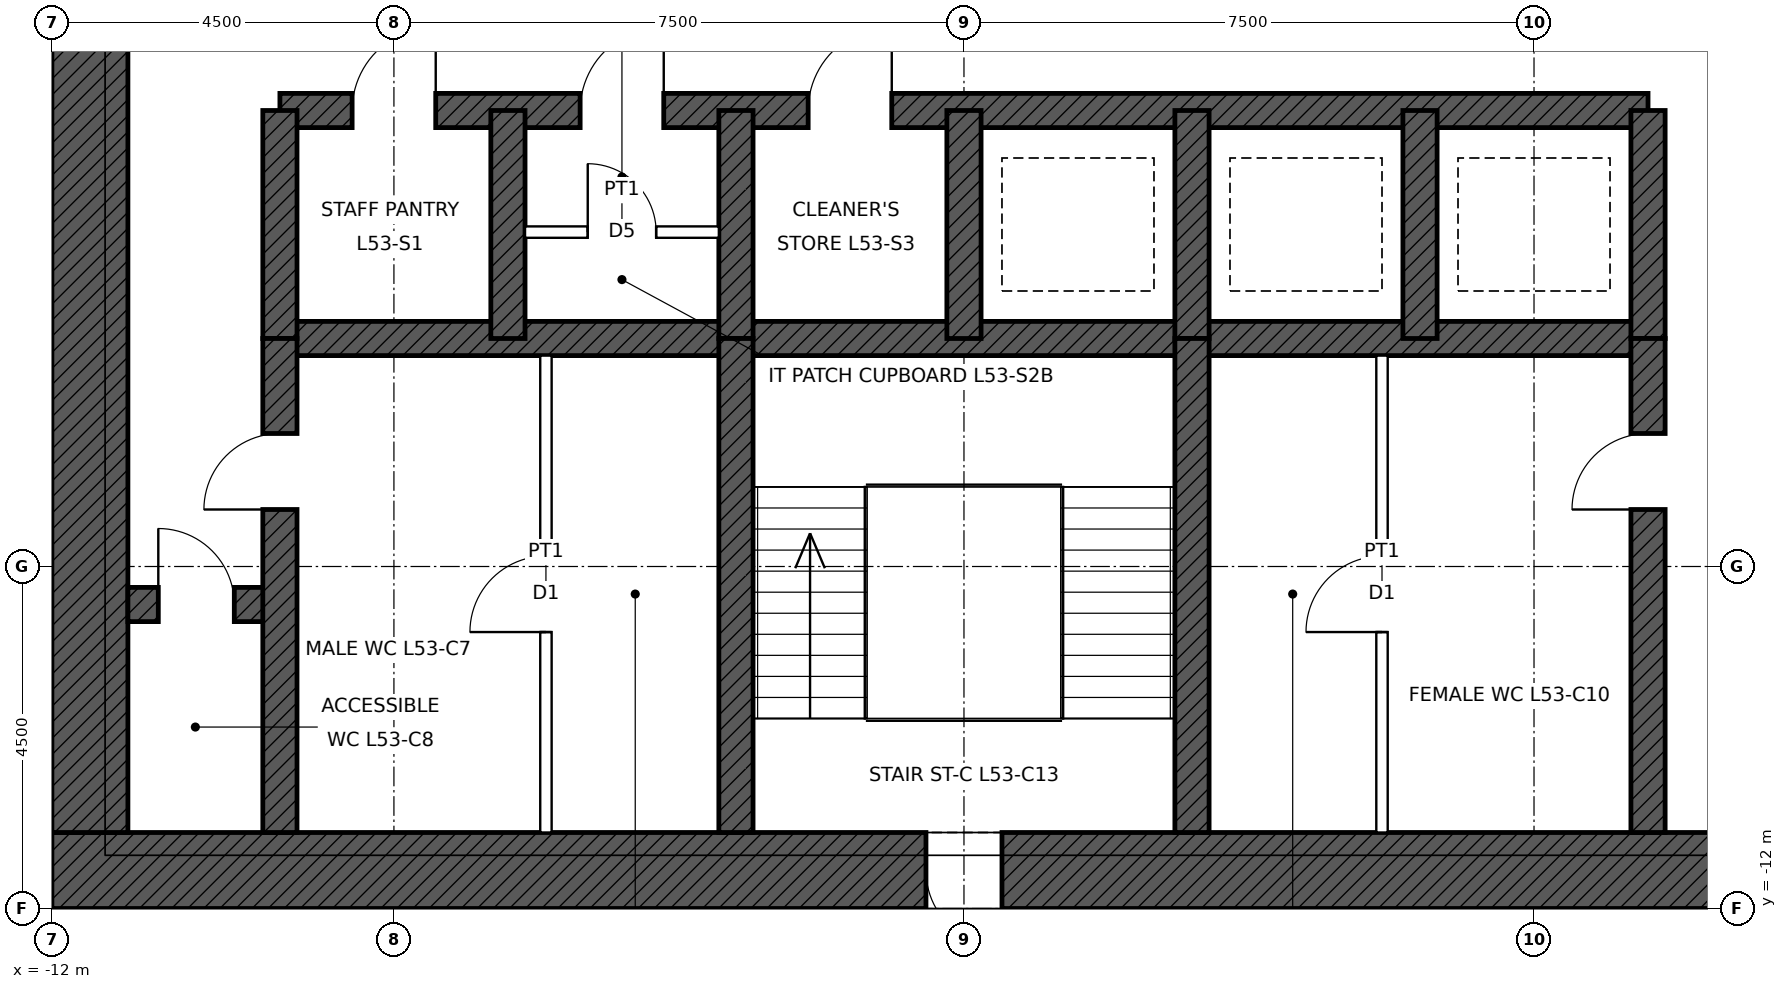
"""IFC4 building model, lengths in metres.
Left out: names, types, materials, properties, quantities, classifications, styles, units other than length and angle.
Written with IfcOpenShell. Run it as: python <this file> out.ifc"""

import sys

from ifc_helpers import new_model, si_unit, direction, frame, frame_2d, origin, place, context, subcontext, project, spatial, rectangle, extrude, element, fill, save


model = new_model("IFC4")
c1 = context("Model", 3, precision=1e-05, world=origin(), true_north=direction((0.0, 1.0)))
c2 = subcontext(c1, "Body", "Model", "MODEL_VIEW")
j1 = project(units=[si_unit("LENGTHUNIT", "METRE"), si_unit("PLANEANGLEUNIT", "RADIAN")], contexts=[c1])
p1 = place(None, origin())
s1 = spatial("IfcSite", under=j1, at=p1, CompositionType="ELEMENT")
p2 = place(p1, origin())
s2 = spatial("IfcBuilding", under=s1, at=p2, CompositionType="ELEMENT")
p3 = place(p2, frame((0.0, 0.0, 245.9)))
s3 = spatial("IfcBuildingStorey", under=s2, at=p3, CompositionType="ELEMENT", Elevation=245.9)
p4 = place(p3, frame((12.0, -11.5, 0.0), z_axis=(0.0, 0.0, 1.0), x_axis=(-1.0, 0.0, 0.0)))
e1 = element("IfcWall", 1, at=p4, inside=s3, PredefinedType="SHEAR", context=c2, shape_type="SweptSolid", body=[
    extrude(rectangle(XDim=24.0, YDim=1.0, at=frame_2d((12.0, 0.0))), origin(), (0.0, 0.0, 1.0), 4.0),
])
p5 = place(p4, frame((11.5, 0.0, 0.0)))
e2 = element("IfcOpeningElement", 2, at=p5, cuts=e1, PredefinedType="OPENING", context=c2, shape_type="SweptSolid", body=[
    extrude(rectangle(XDim=1.0, YDim=2.1, at=frame_2d((0.5, 1.05))), frame((0.0, 0.51, 0.0), z_axis=(0.0, -1.0, 0.0), x_axis=(1.0, 0.0, 0.0)), (0.0, 0.0, 1.0), 1.02),
])
p6 = place(p4, frame((1.0, 0.0, 0.0)))
e3 = element("IfcOpeningElement", 3, at=p6, cuts=e1, PredefinedType="OPENING", context=c2, shape_type="SweptSolid", body=[
    extrude(rectangle(XDim=1.0, YDim=2.4, at=frame_2d((0.5, 1.2))), frame((0.0, 0.51, 0.0), z_axis=(0.0, -1.0, 0.0), x_axis=(1.0, 0.0, 0.0)), (0.0, 0.0, 1.0), 1.02),
])
p7 = place(p3, frame((-11.5, -11.0, 0.0), z_axis=(0.0, 0.0, 1.0), x_axis=(0.0, 1.0, 0.0)))
e4 = element("IfcWall", 4, at=p7, inside=s3, PredefinedType="SHEAR", context=c2, shape_type="SweptSolid", body=[
    extrude(rectangle(XDim=22.0, YDim=1.0, at=frame_2d((11.0, 0.0))), origin(), (0.0, 0.0, 1.0), 4.0),
])
p8 = place(p7, frame((10.5, 0.0, 0.0)))
e5 = element("IfcOpeningElement", 5, at=p8, cuts=e4, PredefinedType="OPENING", context=c2, shape_type="SweptSolid", body=[
    extrude(rectangle(XDim=1.0, YDim=2.4, at=frame_2d((0.5, 1.2))), frame((0.0, 0.51, 0.0), z_axis=(0.0, -1.0, 0.0), x_axis=(1.0, 0.0, 0.0)), (0.0, 0.0, 1.0), 1.02),
])
p9 = place(p3, frame((-9.0, -1.5, 0.0), z_axis=(0.0, 0.0, 1.0), x_axis=(1.0, 0.0, 0.0)))
e6 = element("IfcWall", 6, at=p9, inside=s3, PredefinedType="SHEAR", context=c2, shape_type="SweptSolid", body=[
    extrude(rectangle(XDim=18.0, YDim=0.45, at=frame_2d((9.0, 0.0))), origin(), (0.0, 0.0, 1.0), 4.0),
])
p10 = place(p9, frame((0.95, 0.0, 0.0)))
e7 = element("IfcOpeningElement", 7, at=p10, cuts=e6, PredefinedType="OPENING", context=c2, shape_type="SweptSolid", body=[
    extrude(rectangle(XDim=1.1, YDim=2.1, at=frame_2d((0.55, 1.05))), frame((0.0, 0.235, 0.0), z_axis=(0.0, -1.0, 0.0), x_axis=(1.0, 0.0, 0.0)), (0.0, 0.0, 1.0), 0.47),
])
p11 = place(p9, frame((3.95, 0.0, 0.0)))
e8 = element("IfcOpeningElement", 8, at=p11, cuts=e6, PredefinedType="OPENING", context=c2, shape_type="SweptSolid", body=[
    extrude(rectangle(XDim=1.1, YDim=2.1, at=frame_2d((0.55, 1.05))), frame((0.0, 0.235, 0.0), z_axis=(0.0, -1.0, 0.0), x_axis=(1.0, 0.0, 0.0)), (0.0, 0.0, 1.0), 0.47),
])
p12 = place(p9, frame((6.95, 0.0, 0.0)))
e9 = element("IfcOpeningElement", 9, at=p12, cuts=e6, PredefinedType="OPENING", context=c2, shape_type="SweptSolid", body=[
    extrude(rectangle(XDim=1.1, YDim=2.1, at=frame_2d((0.55, 1.05))), frame((0.0, 0.235, 0.0), z_axis=(0.0, -1.0, 0.0), x_axis=(1.0, 0.0, 0.0)), (0.0, 0.0, 1.0), 0.47),
])
p13 = place(p3, frame((-9.0, -4.5, 0.0), z_axis=(0.0, 0.0, 1.0), x_axis=(1.0, 0.0, 0.0)))
e10 = element("IfcWall", 10, at=p13, inside=s3, PredefinedType="SHEAR", context=c2, shape_type="SweptSolid", body=[
    extrude(rectangle(XDim=18.0, YDim=0.45, at=frame_2d((9.0, 0.0))), origin(), (0.0, 0.0, 1.0), 4.0),
])
p14 = place(p3, frame((-11.0, -8.0, 0.0), z_axis=(0.0, 0.0, 1.0), x_axis=(1.0, 0.0, 0.0)))
e11 = element("IfcWall", 11, at=p14, inside=s3, PredefinedType="SHEAR", context=c2, shape_type="SweptSolid", body=[
    extrude(rectangle(XDim=2.0, YDim=0.45, at=frame_2d((1.0, 0.0))), origin(), (0.0, 0.0, 1.0), 4.0),
])
p15 = place(p14, frame((0.4, 0.0, 0.0)))
e12 = element("IfcOpeningElement", 12, at=p15, cuts=e11, PredefinedType="OPENING", context=c2, shape_type="SweptSolid", body=[
    extrude(rectangle(XDim=1.0, YDim=2.1, at=frame_2d((0.5, 1.05))), frame((0.0, 0.235, 0.0), z_axis=(0.0, -1.0, 0.0), x_axis=(1.0, 0.0, 0.0)), (0.0, 0.0, 1.0), 0.47),
])
for number, where, z_axis, x_axis in (
    (13, (-9.0, -4.5, 0.0), (0.0, 0.0, 1.0), (0.0, 1.0, 0.0)),
    (14, (9.0, -4.5, 0.0), (0.0, 0.0, 1.0), (0.0, 1.0, 0.0)),
    (15, (-6.0, -4.5, 0.0), (0.0, 0.0, 1.0), (0.0, 1.0, 0.0)),
    (16, (-3.0, -4.5, 0.0), (0.0, 0.0, 1.0), (0.0, 1.0, 0.0)),
    (17, (0.0, -4.5, 0.0), (0.0, 0.0, 1.0), (0.0, 1.0, 0.0)),
    (18, (3.0, -4.5, 0.0), (0.0, 0.0, 1.0), (0.0, 1.0, 0.0)),
    (19, (6.0, -4.5, 0.0), (0.0, 0.0, 1.0), (0.0, 1.0, 0.0)),
):
    element("IfcWall", number, at=place(p3, frame(where, z_axis=z_axis, x_axis=x_axis)), inside=s3, PredefinedType="SHEAR", context=c2, shape_type="SweptSolid", body=[
        extrude(rectangle(XDim=3.0, YDim=0.45, at=frame_2d((1.5, 0.0))), origin(), (0.0, 0.0, 1.0), 4.0),
    ])
p16 = place(p3, frame((-9.0, -11.0, 0.0), z_axis=(0.0, 0.0, 1.0), x_axis=(0.0, 1.0, 0.0)))
e20 = element("IfcWall", 20, at=p16, inside=s3, PredefinedType="SHEAR", context=c2, shape_type="SweptSolid", body=[
    extrude(rectangle(XDim=6.5, YDim=0.45, at=frame_2d((3.25, 0.0))), origin(), (0.0, 0.0, 1.0), 4.0),
])
p17 = place(p16, frame((4.25, 0.0, 0.0)))
e21 = element("IfcOpeningElement", 21, at=p17, cuts=e20, PredefinedType="OPENING", context=c2, shape_type="SweptSolid", body=[
    extrude(rectangle(XDim=1.0, YDim=2.1, at=frame_2d((0.5, 1.05))), frame((0.0, 0.235, 0.0), z_axis=(0.0, -1.0, 0.0), x_axis=(1.0, 0.0, 0.0)), (0.0, 0.0, 1.0), 0.47),
])
p18 = place(p3, frame((9.0, -11.0, 0.0), z_axis=(0.0, 0.0, 1.0), x_axis=(0.0, 1.0, 0.0)))
e22 = element("IfcWall", 22, at=p18, inside=s3, PredefinedType="SHEAR", context=c2, shape_type="SweptSolid", body=[
    extrude(rectangle(XDim=6.5, YDim=0.45, at=frame_2d((3.25, 0.0))), origin(), (0.0, 0.0, 1.0), 4.0),
])
p19 = place(p18, frame((4.25, 0.0, 0.0)))
e23 = element("IfcOpeningElement", 23, at=p19, cuts=e22, PredefinedType="OPENING", context=c2, shape_type="SweptSolid", body=[
    extrude(rectangle(XDim=1.0, YDim=2.1, at=frame_2d((0.5, 1.05))), frame((0.0, 0.235, 0.0), z_axis=(0.0, -1.0, 0.0), x_axis=(1.0, 0.0, 0.0)), (0.0, 0.0, 1.0), 0.47),
])
for number, where, z_axis, x_axis in (
    (24, (-3.0, -11.0, 0.0), (0.0, 0.0, 1.0), (0.0, 1.0, 0.0)),
    (25, (3.0, -11.0, 0.0), (0.0, 0.0, 1.0), (0.0, 1.0, 0.0)),
):
    element("IfcWall", number, at=place(p3, frame(where, z_axis=z_axis, x_axis=x_axis)), inside=s3, PredefinedType="SHEAR", context=c2, shape_type="SweptSolid", body=[
        extrude(rectangle(XDim=6.5, YDim=0.45, at=frame_2d((3.25, 0.0))), origin(), (0.0, 0.0, 1.0), 4.0),
    ])
p20 = place(p3, frame((-5.5, -11.0, 0.0), z_axis=(0.0, 0.0, 1.0), x_axis=(0.0, 1.0, 0.0)))
e26 = element("IfcWall", 26, at=p20, inside=s3, PredefinedType="PARTITIONING", context=c2, shape_type="SweptSolid", body=[
    extrude(rectangle(XDim=6.275, YDim=0.15, at=frame_2d((3.137, 0.0))), origin(), (0.0, 0.0, 1.0), 3.75),
])
p21 = place(p20, frame((2.637, 0.0, 0.0)))
e27 = element("IfcOpeningElement", 27, at=p21, cuts=e26, PredefinedType="OPENING", context=c2, shape_type="SweptSolid", body=[
    extrude(rectangle(XDim=1.0, YDim=2.1, at=frame_2d((0.5, 1.05))), frame((0.0, 0.085, 0.0), z_axis=(0.0, -1.0, 0.0), x_axis=(1.0, 0.0, 0.0)), (0.0, 0.0, 1.0), 0.17),
])
p22 = place(p3, frame((5.5, -11.0, 0.0), z_axis=(0.0, 0.0, 1.0), x_axis=(0.0, 1.0, 0.0)))
e28 = element("IfcWall", 28, at=p22, inside=s3, PredefinedType="PARTITIONING", context=c2, shape_type="SweptSolid", body=[
    extrude(rectangle(XDim=6.275, YDim=0.15, at=frame_2d((3.137, 0.0))), origin(), (0.0, 0.0, 1.0), 3.75),
])
p23 = place(p22, frame((2.637, 0.0, 0.0)))
e29 = element("IfcOpeningElement", 29, at=p23, cuts=e28, PredefinedType="OPENING", context=c2, shape_type="SweptSolid", body=[
    extrude(rectangle(XDim=1.0, YDim=2.1, at=frame_2d((0.5, 1.05))), frame((0.0, 0.085, 0.0), z_axis=(0.0, -1.0, 0.0), x_axis=(1.0, 0.0, 0.0)), (0.0, 0.0, 1.0), 0.17),
])
p24 = place(p3, frame((-5.775, -3.1, 0.0), z_axis=(0.0, 0.0, 1.0), x_axis=(1.0, 0.0, 0.0)))
e30 = element("IfcWall", 30, at=p24, inside=s3, PredefinedType="PARTITIONING", context=c2, shape_type="SweptSolid", body=[
    extrude(rectangle(XDim=2.55, YDim=0.15, at=frame_2d((1.275, 0.0))), origin(), (0.0, 0.0, 1.0), 3.75),
])
p25 = place(p24, frame((0.825, 0.0, 0.0)))
e31 = element("IfcOpeningElement", 31, at=p25, cuts=e30, PredefinedType="OPENING", context=c2, shape_type="SweptSolid", body=[
    extrude(rectangle(XDim=0.9, YDim=2.1, at=frame_2d((0.45, 1.05))), frame((0.0, 0.085, 0.0), z_axis=(0.0, -1.0, 0.0), x_axis=(1.0, 0.0, 0.0)), (0.0, 0.0, 1.0), 0.17),
])
p26 = place(p5, origin())
e32 = element("IfcDoor", 32, at=p26, inside=s3, OperationType="SINGLE_SWING_LEFT", PredefinedType="DOOR", context=c2, shape_type="SweptSolid", body=[
    extrude(rectangle(XDim=1.0, YDim=2.1, at=frame_2d((0.5, 1.05))), frame((0.0, 0.485, 0.0), z_axis=(0.0, -1.0, 0.0), x_axis=(1.0, 0.0, 0.0)), (0.0, 0.0, 1.0), 0.05),
])
fill(e2, e32)
p27 = place(p17, origin())
e33 = element("IfcDoor", 33, at=p27, inside=s3, OperationType="SINGLE_SWING_LEFT", PredefinedType="DOOR", context=c2, shape_type="SweptSolid", body=[
    extrude(rectangle(XDim=1.0, YDim=2.1, at=frame_2d((0.5, 1.05))), frame((0.0, 0.025, 0.0), z_axis=(0.0, -1.0, 0.0), x_axis=(1.0, 0.0, 0.0)), (0.0, 0.0, 1.0), 0.05),
])
fill(e21, e33)
p28 = place(p19, origin())
e34 = element("IfcDoor", 34, at=p28, inside=s3, OperationType="SINGLE_SWING_LEFT", PredefinedType="DOOR", context=c2, shape_type="SweptSolid", body=[
    extrude(rectangle(XDim=1.0, YDim=2.1, at=frame_2d((0.5, 1.05))), frame((0.0, 0.025, 0.0), z_axis=(0.0, -1.0, 0.0), x_axis=(1.0, 0.0, 0.0)), (0.0, 0.0, 1.0), 0.05),
])
fill(e23, e34)
p29 = place(p15, origin())
e35 = element("IfcDoor", 35, at=p29, inside=s3, OperationType="SINGLE_SWING_LEFT", PredefinedType="DOOR", context=c2, shape_type="SweptSolid", body=[
    extrude(rectangle(XDim=1.0, YDim=2.1, at=frame_2d((0.5, 1.05))), frame((0.0, 0.025, 0.0), z_axis=(0.0, -1.0, 0.0), x_axis=(1.0, 0.0, 0.0)), (0.0, 0.0, 1.0), 0.05),
])
fill(e12, e35)
p30 = place(p21, origin())
e36 = element("IfcDoor", 36, at=p30, inside=s3, OperationType="SINGLE_SWING_LEFT", PredefinedType="DOOR", context=c2, shape_type="SweptSolid", body=[
    extrude(rectangle(XDim=1.0, YDim=2.1, at=frame_2d((0.5, 1.05))), frame((0.0, 0.025, 0.0), z_axis=(0.0, -1.0, 0.0), x_axis=(1.0, 0.0, 0.0)), (0.0, 0.0, 1.0), 0.05),
])
fill(e27, e36)
p31 = place(p23, origin())
e37 = element("IfcDoor", 37, at=p31, inside=s3, OperationType="SINGLE_SWING_LEFT", PredefinedType="DOOR", context=c2, shape_type="SweptSolid", body=[
    extrude(rectangle(XDim=1.0, YDim=2.1, at=frame_2d((0.5, 1.05))), frame((0.0, 0.025, 0.0), z_axis=(0.0, -1.0, 0.0), x_axis=(1.0, 0.0, 0.0)), (0.0, 0.0, 1.0), 0.05),
])
fill(e29, e37)
p32 = place(p10, origin())
e38 = element("IfcDoor", 38, at=p32, inside=s3, OperationType="SINGLE_SWING_RIGHT", PredefinedType="DOOR", context=c2, shape_type="SweptSolid", body=[
    extrude(rectangle(XDim=1.1, YDim=2.1, at=frame_2d((0.55, 1.05))), frame((0.0, 0.025, 0.0), z_axis=(0.0, -1.0, 0.0), x_axis=(1.0, 0.0, 0.0)), (0.0, 0.0, 1.0), 0.05),
])
fill(e7, e38)
p33 = place(p11, origin())
e39 = element("IfcDoor", 39, at=p33, inside=s3, OperationType="SINGLE_SWING_RIGHT", PredefinedType="DOOR", context=c2, shape_type="SweptSolid", body=[
    extrude(rectangle(XDim=1.1, YDim=2.1, at=frame_2d((0.55, 1.05))), frame((0.0, 0.025, 0.0), z_axis=(0.0, -1.0, 0.0), x_axis=(1.0, 0.0, 0.0)), (0.0, 0.0, 1.0), 0.05),
])
fill(e8, e39)
p34 = place(p25, origin())
e40 = element("IfcDoor", 40, at=p34, inside=s3, OperationType="SINGLE_SWING_LEFT", PredefinedType="DOOR", context=c2, shape_type="SweptSolid", body=[
    extrude(rectangle(XDim=0.9, YDim=2.1, at=frame_2d((0.45, 1.05))), frame((0.0, 0.025, 0.0), z_axis=(0.0, -1.0, 0.0), x_axis=(1.0, 0.0, 0.0)), (0.0, 0.0, 1.0), 0.05),
])
fill(e31, e40)
p35 = place(p12, origin())
e41 = element("IfcDoor", 41, at=p35, inside=s3, OperationType="SINGLE_SWING_RIGHT", PredefinedType="DOOR", context=c2, shape_type="SweptSolid", body=[
    extrude(rectangle(XDim=1.1, YDim=2.1, at=frame_2d((0.55, 1.05))), frame((0.0, 0.025, 0.0), z_axis=(0.0, -1.0, 0.0), x_axis=(1.0, 0.0, 0.0)), (0.0, 0.0, 1.0), 0.05),
])
fill(e9, e41)
save(model, sys.argv[1])
